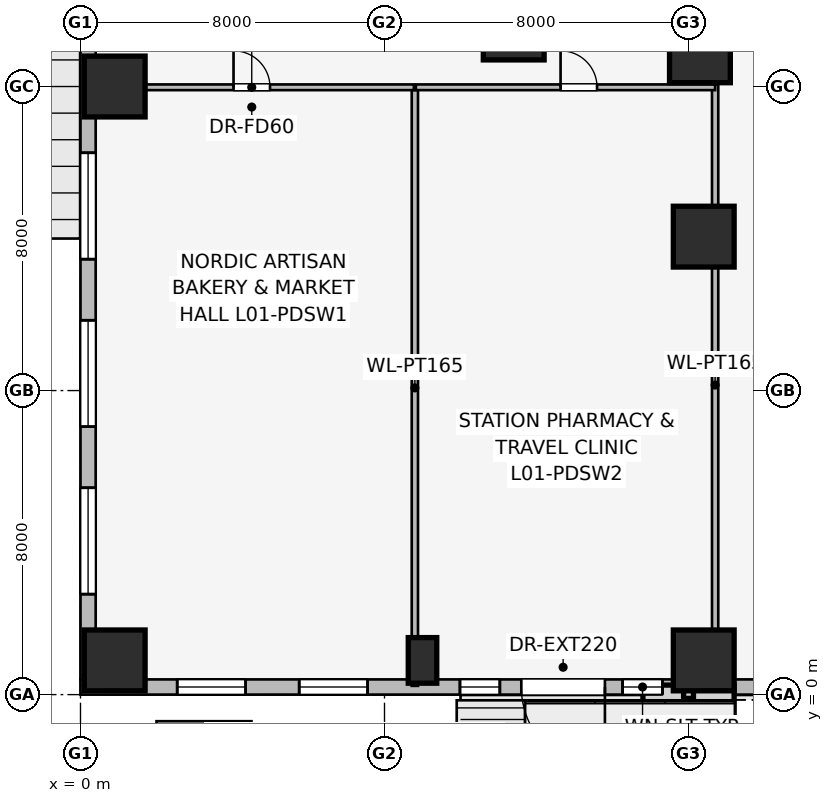
"""IFC4 building model, lengths in metres.
Left out: names, types, materials, properties, quantities, classifications, styles, units other than length and angle.
Written with IfcOpenShell. Run it as: python <this file> out.ifc"""

import sys

from ifc_helpers import new_model, si_unit, direction, frame, frame_2d, origin, origin_2d, place, context, subcontext, project, spatial, rectangle, extrude, element, fill, save


model = new_model("IFC4")
c1 = context("Model", 3, precision=1e-05, world=origin(), true_north=direction((0.0, 1.0)))
c2 = subcontext(c1, "Body", "Model", "MODEL_VIEW")
j1 = project(units=[si_unit("LENGTHUNIT", "METRE"), si_unit("PLANEANGLEUNIT", "RADIAN")], contexts=[c1])
p1 = place(None, origin())
s1 = spatial("IfcSite", under=j1, at=p1, CompositionType="ELEMENT")
p2 = place(p1, origin())
s2 = spatial("IfcBuilding", under=s1, at=p2, CompositionType="ELEMENT")
p3 = place(p2, origin())
s3 = spatial("IfcBuildingStorey", under=s2, at=p3, CompositionType="ELEMENT", Elevation=0.0)
for number, where, z_axis, x_axis in (
    (1, (16.3, 16.9, 0.0), (0.0, 0.0, 1.0), (1.0, 0.0, 0.0)),
    (2, (0.9, 0.9, 0.0), (0.0, 0.0, 1.0), (1.0, 0.0, 0.0)),
    (3, (16.4, 0.9, 0.0), (0.0, 0.0, 1.0), (1.0, 0.0, 0.0)),
    (4, (0.9, 16.0, 0.0), (0.0, 0.0, 1.0), (1.0, 0.0, 0.0)),
    (5, (11.4, 17.5, 0.0), (0.0, 0.0, 1.0), (1.0, 0.0, 0.0)),
    (6, (16.4, 12.05, 0.0), (0.0, 0.0, 1.0), (1.0, 0.0, 0.0)),
):
    element("IfcColumn", number, at=place(p3, frame(where, z_axis=z_axis, x_axis=x_axis)), inside=s3, PredefinedType="COLUMN", context=c2, shape_type="SweptSolid", body=[
        extrude(rectangle(XDim=1.6, YDim=1.6, at=origin_2d()), origin(), (0.0, 0.0, 1.0), 6.0),
    ])
p4 = place(p3, frame((9.0, 0.9, 0.0), z_axis=(0.0, 0.0, 1.0), x_axis=(1.0, 0.0, 0.0)))
e7 = element("IfcColumn", 7, at=p4, inside=s3, PredefinedType="PILASTER", context=c2, shape_type="SweptSolid", body=[
    extrude(rectangle(XDim=0.75, YDim=1.2, at=origin_2d()), origin(), (0.0, 0.0, 1.0), 6.0),
])
p5 = place(p3, frame((26.2, 0.2, 0.0), z_axis=(0.0, 0.0, 1.0), x_axis=(-1.0, 0.0, 0.0)))
e8 = element("IfcWall", 8, at=p5, inside=s3, PredefinedType="STANDARD", context=c2, shape_type="SweptSolid", body=[
    extrude(rectangle(XDim=26.2, YDim=0.4, at=frame_2d((13.1, 0.0))), origin(), (0.0, 0.0, 1.0), 5.69),
])
p6 = place(p5, frame((1.8, 0.0, 0.0)))
e9 = element("IfcOpeningElement", 9, at=p6, cuts=e8, PredefinedType="OPENING", context=c2, shape_type="SweptSolid", body=[
    extrude(rectangle(XDim=1.8, YDim=2.3, at=frame_2d((0.9, 1.15))), frame((0.0, 0.21, 0.0), z_axis=(0.0, -1.0, 0.0), x_axis=(1.0, 0.0, 0.0)), (0.0, 0.0, 1.0), 0.42),
])
p7 = place(p5, frame((12.4, 0.0, 0.0)))
e10 = element("IfcOpeningElement", 10, at=p7, cuts=e8, PredefinedType="OPENING", context=c2, shape_type="SweptSolid", body=[
    extrude(rectangle(XDim=2.2, YDim=2.6, at=frame_2d((1.1, 1.3))), frame((0.0, 0.21, 0.0), z_axis=(0.0, -1.0, 0.0), x_axis=(1.0, 0.0, 0.0)), (0.0, 0.0, 1.0), 0.42),
])
p8 = place(p5, frame((5.11, 0.0, 0.75)))
e11 = element("IfcOpeningElement", 11, at=p8, cuts=e8, PredefinedType="OPENING", context=c2, shape_type="SweptSolid", body=[
    extrude(rectangle(XDim=2.8, YDim=1.8, at=frame_2d((1.4, 0.9))), frame((0.0, 0.21, 0.0), z_axis=(0.0, -1.0, 0.0), x_axis=(1.0, 0.0, 0.0)), (0.0, 0.0, 1.0), 0.42),
])
p9 = place(p5, frame((10.885, 0.0, 0.75)))
e12 = element("IfcOpeningElement", 12, at=p9, cuts=e8, PredefinedType="OPENING", context=c2, shape_type="SweptSolid", body=[
    extrude(rectangle(XDim=1.05, YDim=1.4, at=frame_2d((0.525, 0.7))), frame((0.0, 0.21, 0.0), z_axis=(0.0, -1.0, 0.0), x_axis=(1.0, 0.0, 0.0)), (0.0, 0.0, 1.0), 0.42),
])
p10 = place(p5, frame((15.165, 0.0, 0.75)))
e13 = element("IfcOpeningElement", 13, at=p10, cuts=e8, PredefinedType="OPENING", context=c2, shape_type="SweptSolid", body=[
    extrude(rectangle(XDim=1.05, YDim=1.4, at=frame_2d((0.525, 0.7))), frame((0.0, 0.21, 0.0), z_axis=(0.0, -1.0, 0.0), x_axis=(1.0, 0.0, 0.0)), (0.0, 0.0, 1.0), 0.42),
])
p11 = place(p5, frame((18.645, 0.0, 0.75)))
e14 = element("IfcOpeningElement", 14, at=p11, cuts=e8, PredefinedType="OPENING", context=c2, shape_type="SweptSolid", body=[
    extrude(rectangle(XDim=1.8, YDim=1.5, at=frame_2d((0.9, 0.75))), frame((0.0, 0.21, 0.0), z_axis=(0.0, -1.0, 0.0), x_axis=(1.0, 0.0, 0.0)), (0.0, 0.0, 1.0), 0.42),
])
p12 = place(p5, frame((21.855, 0.0, 0.75)))
e15 = element("IfcOpeningElement", 15, at=p12, cuts=e8, PredefinedType="OPENING", context=c2, shape_type="SweptSolid", body=[
    extrude(rectangle(XDim=1.8, YDim=1.5, at=frame_2d((0.9, 0.75))), frame((0.0, 0.21, 0.0), z_axis=(0.0, -1.0, 0.0), x_axis=(1.0, 0.0, 0.0)), (0.0, 0.0, 1.0), 0.42),
])
p13 = place(p3, frame((0.2, 0.4, 0.0), z_axis=(0.0, 0.0, 1.0), x_axis=(0.0, 1.0, 0.0)))
e16 = element("IfcWall", 16, at=p13, inside=s3, PredefinedType="STANDARD", context=c2, shape_type="SweptSolid", body=[
    extrude(rectangle(XDim=23.6, YDim=0.4, at=frame_2d((11.8, 0.0))), origin(), (0.0, 0.0, 1.0), 5.69),
])
p14 = place(p13, frame((19.85, 0.0, 0.0)))
e17 = element("IfcOpeningElement", 17, at=p14, cuts=e16, PredefinedType="OPENING", context=c2, shape_type="SweptSolid", body=[
    extrude(rectangle(XDim=1.8, YDim=2.3, at=frame_2d((0.9, 1.15))), frame((0.0, 0.21, 0.0), z_axis=(0.0, -1.0, 0.0), x_axis=(1.0, 0.0, 0.0)), (0.0, 0.0, 1.0), 0.42),
])
p15 = place(p13, frame((2.243, 0.0, 0.75)))
e18 = element("IfcOpeningElement", 18, at=p15, cuts=e16, PredefinedType="OPENING", context=c2, shape_type="SweptSolid", body=[
    extrude(rectangle(XDim=2.8, YDim=1.8, at=frame_2d((1.4, 0.9))), frame((0.0, 0.21, 0.0), z_axis=(0.0, -1.0, 0.0), x_axis=(1.0, 0.0, 0.0)), (0.0, 0.0, 1.0), 0.42),
])
p16 = place(p13, frame((6.65, 0.0, 0.75)))
e19 = element("IfcOpeningElement", 19, at=p16, cuts=e16, PredefinedType="OPENING", context=c2, shape_type="SweptSolid", body=[
    extrude(rectangle(XDim=2.8, YDim=1.8, at=frame_2d((1.4, 0.9))), frame((0.0, 0.21, 0.0), z_axis=(0.0, -1.0, 0.0), x_axis=(1.0, 0.0, 0.0)), (0.0, 0.0, 1.0), 0.42),
])
p17 = place(p13, frame((11.057, 0.0, 0.75)))
e20 = element("IfcOpeningElement", 20, at=p17, cuts=e16, PredefinedType="OPENING", context=c2, shape_type="SweptSolid", body=[
    extrude(rectangle(XDim=2.8, YDim=1.8, at=frame_2d((1.4, 0.9))), frame((0.0, 0.21, 0.0), z_axis=(0.0, -1.0, 0.0), x_axis=(1.0, 0.0, 0.0)), (0.0, 0.0, 1.0), 0.42),
])
p18 = place(p13, frame((16.74, 0.0, 0.75)))
e21 = element("IfcOpeningElement", 21, at=p18, cuts=e16, PredefinedType="OPENING", context=c2, shape_type="SweptSolid", body=[
    extrude(rectangle(XDim=1.8, YDim=1.5, at=frame_2d((0.9, 0.75))), frame((0.0, 0.21, 0.0), z_axis=(0.0, -1.0, 0.0), x_axis=(1.0, 0.0, 0.0)), (0.0, 0.0, 1.0), 0.42),
])
p19 = place(p3, frame((16.7, 0.24, 0.0), z_axis=(0.0, 0.0, 1.0), x_axis=(0.0, 1.0, 0.0)))
e22 = element("IfcWall", 22, at=p19, inside=s3, PredefinedType="PARTITIONING", context=c2, shape_type="SweptSolid", body=[
    extrude(rectangle(XDim=15.81, YDim=0.165, at=frame_2d((7.905, 0.0))), origin(), (0.0, 0.0, 1.0), 4.763),
])
p20 = place(p3, frame((8.799, 0.23, 0.0), z_axis=(0.0, 0.0, 1.0), x_axis=(0.0, 1.0, 0.0)))
e23 = element("IfcWall", 23, at=p20, inside=s3, PredefinedType="PARTITIONING", context=c2, shape_type="SweptSolid", body=[
    extrude(rectangle(XDim=15.68, YDim=0.165, at=frame_2d((7.84, 0.0))), origin(), (0.0, 0.0, 1.0), 5.69),
])
p21 = place(p3, frame((0.24, 15.98, 0.0), z_axis=(0.0, 0.0, 1.0), x_axis=(1.0, 0.0, 0.0)))
e24 = element("IfcWall", 24, at=p21, inside=s3, PredefinedType="PARTITIONING", context=c2, shape_type="SweptSolid", body=[
    extrude(rectangle(XDim=8.533, YDim=0.15, at=frame_2d((4.267, 0.0))), origin(), (0.0, 0.0, 1.0), 4.742),
])
p22 = place(p21, frame((3.787, 0.0, 0.0)))
e25 = element("IfcOpeningElement", 25, at=p22, cuts=e24, PredefinedType="OPENING", context=c2, shape_type="SweptSolid", body=[
    extrude(rectangle(XDim=0.96, YDim=2.0, at=frame_2d((0.48, 1.0))), frame((0.0, 0.085, 0.0), z_axis=(0.0, -1.0, 0.0), x_axis=(1.0, 0.0, 0.0)), (0.0, 0.0, 1.0), 0.17),
])
p23 = place(p3, frame((8.825, 15.98, 0.0), z_axis=(0.0, 0.0, 1.0), x_axis=(1.0, 0.0, 0.0)))
e26 = element("IfcWall", 26, at=p23, inside=s3, PredefinedType="PARTITIONING", context=c2, shape_type="SweptSolid", body=[
    extrude(rectangle(XDim=7.875, YDim=0.15, at=frame_2d((3.938, 0.0))), origin(), (0.0, 0.0, 1.0), 5.69),
])
p24 = place(p23, frame((3.808, 0.0, 0.0)))
e27 = element("IfcOpeningElement", 27, at=p24, cuts=e26, PredefinedType="OPENING", context=c2, shape_type="SweptSolid", body=[
    extrude(rectangle(XDim=0.96, YDim=2.0, at=frame_2d((0.48, 1.0))), frame((0.0, 0.085, 0.0), z_axis=(0.0, -1.0, 0.0), x_axis=(1.0, 0.0, 0.0)), (0.0, 0.0, 1.0), 0.17),
])
p25 = place(p7, origin())
e28 = element("IfcDoor", 28, at=p25, inside=s3, OperationType="SINGLE_SWING_LEFT", PredefinedType="DOOR", context=c2, shape_type="SweptSolid", body=[
    extrude(rectangle(XDim=2.2, YDim=2.6, at=frame_2d((1.1, 1.3))), frame((0.0, 0.025, 0.0), z_axis=(0.0, -1.0, 0.0), x_axis=(1.0, 0.0, 0.0)), (0.0, 0.0, 1.0), 0.05),
])
fill(e10, e28)
p26 = place(p9, origin())
e29 = element("IfcWindow", 29, at=p26, inside=s3, PartitioningType="SINGLE_PANEL", PredefinedType="WINDOW", context=c2, shape_type="SweptSolid", body=[
    extrude(rectangle(XDim=1.05, YDim=1.4, at=frame_2d((0.525, 0.7))), frame((0.0, 0.03, 0.0), z_axis=(0.0, -1.0, 0.0), x_axis=(1.0, 0.0, 0.0)), (0.0, 0.0, 1.0), 0.06),
])
fill(e12, e29)
p27 = place(p10, origin())
e30 = element("IfcWindow", 30, at=p27, inside=s3, PartitioningType="SINGLE_PANEL", PredefinedType="WINDOW", context=c2, shape_type="SweptSolid", body=[
    extrude(rectangle(XDim=1.05, YDim=1.4, at=frame_2d((0.525, 0.7))), frame((0.0, 0.03, 0.0), z_axis=(0.0, -1.0, 0.0), x_axis=(1.0, 0.0, 0.0)), (0.0, 0.0, 1.0), 0.06),
])
fill(e13, e30)
p28 = place(p11, origin())
e31 = element("IfcWindow", 31, at=p28, inside=s3, PartitioningType="SINGLE_PANEL", PredefinedType="WINDOW", context=c2, shape_type="SweptSolid", body=[
    extrude(rectangle(XDim=1.8, YDim=1.5, at=frame_2d((0.9, 0.75))), frame((0.0, 0.03, 0.0), z_axis=(0.0, -1.0, 0.0), x_axis=(1.0, 0.0, 0.0)), (0.0, 0.0, 1.0), 0.06),
])
fill(e14, e31)
p29 = place(p12, origin())
e32 = element("IfcWindow", 32, at=p29, inside=s3, PartitioningType="SINGLE_PANEL", PredefinedType="WINDOW", context=c2, shape_type="SweptSolid", body=[
    extrude(rectangle(XDim=1.8, YDim=1.5, at=frame_2d((0.9, 0.75))), frame((0.0, 0.03, 0.0), z_axis=(0.0, -1.0, 0.0), x_axis=(1.0, 0.0, 0.0)), (0.0, 0.0, 1.0), 0.06),
])
fill(e15, e32)
p30 = place(p15, origin())
e33 = element("IfcWindow", 33, at=p30, inside=s3, PartitioningType="SINGLE_PANEL", PredefinedType="WINDOW", context=c2, shape_type="SweptSolid", body=[
    extrude(rectangle(XDim=2.8, YDim=1.8, at=frame_2d((1.4, 0.9))), frame((0.0, 0.03, 0.0), z_axis=(0.0, -1.0, 0.0), x_axis=(1.0, 0.0, 0.0)), (0.0, 0.0, 1.0), 0.06),
])
fill(e18, e33)
p31 = place(p16, origin())
e34 = element("IfcWindow", 34, at=p31, inside=s3, PartitioningType="SINGLE_PANEL", PredefinedType="WINDOW", context=c2, shape_type="SweptSolid", body=[
    extrude(rectangle(XDim=2.8, YDim=1.8, at=frame_2d((1.4, 0.9))), frame((0.0, 0.03, 0.0), z_axis=(0.0, -1.0, 0.0), x_axis=(1.0, 0.0, 0.0)), (0.0, 0.0, 1.0), 0.06),
])
fill(e19, e34)
p32 = place(p17, origin())
e35 = element("IfcWindow", 35, at=p32, inside=s3, PartitioningType="SINGLE_PANEL", PredefinedType="WINDOW", context=c2, shape_type="SweptSolid", body=[
    extrude(rectangle(XDim=2.8, YDim=1.8, at=frame_2d((1.4, 0.9))), frame((0.0, 0.03, 0.0), z_axis=(0.0, -1.0, 0.0), x_axis=(1.0, 0.0, 0.0)), (0.0, 0.0, 1.0), 0.06),
])
fill(e20, e35)
p33 = place(p22, origin())
e36 = element("IfcDoor", 36, at=p33, inside=s3, OperationType="SINGLE_SWING_LEFT", PredefinedType="DOOR", context=c2, shape_type="SweptSolid", body=[
    extrude(rectangle(XDim=0.96, YDim=2.0, at=frame_2d((0.48, 1.0))), frame((0.0, 0.025, 0.0), z_axis=(0.0, -1.0, 0.0), x_axis=(1.0, 0.0, 0.0)), (0.0, 0.0, 1.0), 0.05),
])
fill(e25, e36)
p34 = place(p24, origin())
e37 = element("IfcDoor", 37, at=p34, inside=s3, OperationType="SINGLE_SWING_LEFT", PredefinedType="DOOR", context=c2, shape_type="SweptSolid", body=[
    extrude(rectangle(XDim=0.96, YDim=2.0, at=frame_2d((0.48, 1.0))), frame((0.0, 0.025, 0.0), z_axis=(0.0, -1.0, 0.0), x_axis=(1.0, 0.0, 0.0)), (0.0, 0.0, 1.0), 0.05),
])
fill(e27, e37)
save(model, sys.argv[1])
